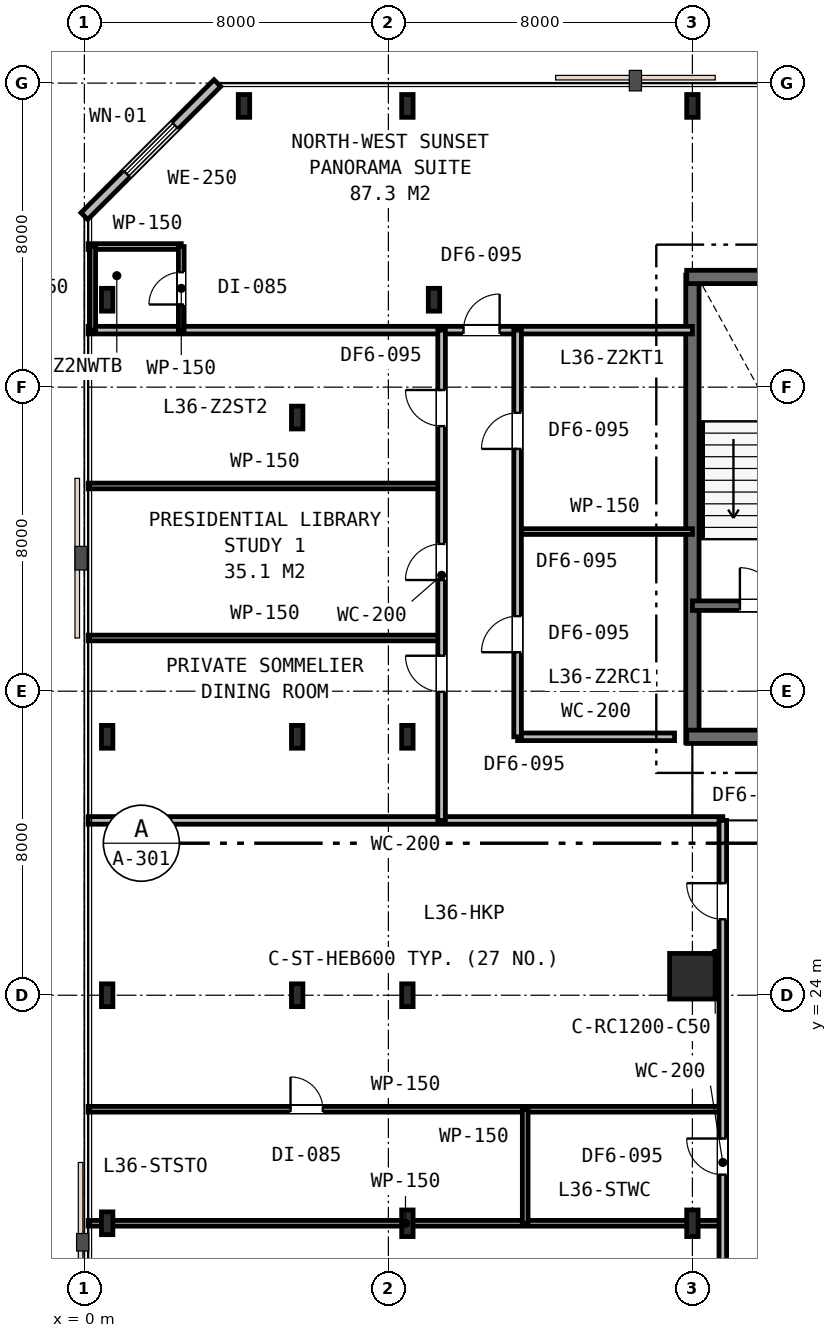
"""IFC4 building model, lengths in metres.
Left out: names, types, materials, properties, quantities, classifications, styles, units other than length and angle.
Written with IfcOpenShell. Run it as: python <this file> out.ifc"""

import sys

from ifc_helpers import new_model, si_unit, direction, frame, frame_2d, origin, origin_2d, place, context, subcontext, project, spatial, rectangle, i_section, extrude, element, fill, save


model = new_model("IFC4")
c1 = context("Model", 3, precision=1e-05, world=origin(), true_north=direction((0.0, 1.0)))
c2 = subcontext(c1, "Body", "Model", "MODEL_VIEW")
j1 = project(units=[si_unit("LENGTHUNIT", "METRE"), si_unit("PLANEANGLEUNIT", "RADIAN")], contexts=[c1])
p1 = place(None, origin())
s1 = spatial("IfcSite", under=j1, at=p1, CompositionType="ELEMENT")
p2 = place(p1, origin())
s2 = spatial("IfcBuilding", under=s1, at=p2, CompositionType="ELEMENT")
p3 = place(p2, frame((0.0, 0.0, 140.4)))
s3 = spatial("IfcBuildingStorey", under=s2, at=p3, CompositionType="ELEMENT", Elevation=140.4)
p4 = place(p3, frame((16.0, 30.65, 0.0), z_axis=(0.0, 0.0, 1.0), x_axis=(0.0, 1.0, 0.0)))
e1 = element("IfcWall", 1, at=p4, inside=s3, PredefinedType="SHEAR", context=c2, shape_type="SweptSolid", body=[
    extrude(rectangle(XDim=12.3, YDim=0.35, at=frame_2d((6.15, 0.0))), origin(), (0.0, 0.0, 1.0), 3.6),
])
p5 = place(p3, frame((15.85, 42.9, 0.0), z_axis=(0.0, 0.0, 1.0), x_axis=(1.0, 0.0, 0.0)))
e2 = element("IfcWall", 2, at=p5, inside=s3, PredefinedType="SHEAR", context=c2, shape_type="SweptSolid", body=[
    extrude(rectangle(XDim=24.3, YDim=0.35, at=frame_2d((12.15, 0.0))), origin(), (0.0, 0.0, 1.0), 3.6),
])
p6 = place(p3, frame((15.85, 30.8, 0.0), z_axis=(0.0, 0.0, 1.0), x_axis=(1.0, 0.0, 0.0)))
e3 = element("IfcWall", 3, at=p6, inside=s3, PredefinedType="SHEAR", context=c2, shape_type="SweptSolid", body=[
    extrude(rectangle(XDim=11.2, YDim=0.35, at=frame_2d((5.6, 0.0))), origin(), (0.0, 0.0, 1.0), 3.6),
])
p7 = place(p6, frame((2.45, 0.0, 0.0)))
e4 = element("IfcOpeningElement", 4, at=p7, cuts=e3, PredefinedType="OPENING", context=c2, shape_type="SweptSolid", body=[
    extrude(rectangle(XDim=1.1, YDim=2.15, at=frame_2d((0.55, 1.075))), frame((0.0, 0.185, 0.0), z_axis=(0.0, -1.0, 0.0), x_axis=(1.0, 0.0, 0.0)), (0.0, 0.0, 1.0), 0.37),
])
p8 = place(p3, frame((16.0, 34.25, 0.0), z_axis=(0.0, 0.0, 1.0), x_axis=(1.0, 0.0, 0.0)))
e5 = element("IfcWall", 5, at=p8, inside=s3, PredefinedType="SHEAR", context=c2, shape_type="SweptSolid", body=[
    extrude(rectangle(XDim=6.05, YDim=0.25, at=frame_2d((3.025, 0.0))), origin(), (0.0, 0.0, 1.0), 3.6),
])
p9 = place(p8, frame((1.25, 0.0, 0.0)))
e6 = element("IfcOpeningElement", 6, at=p9, cuts=e5, PredefinedType="OPENING", context=c2, shape_type="SweptSolid", body=[
    extrude(rectangle(XDim=1.0, YDim=2.15, at=frame_2d((0.5, 1.075))), frame((0.0, 0.135, 0.0), z_axis=(0.0, -1.0, 0.0), x_axis=(1.0, 0.0, 0.0)), (0.0, 0.0, 1.0), 0.27),
])
p10 = place(p8, frame((4.2, 0.0, 0.0)))
e7 = element("IfcOpeningElement", 7, at=p10, cuts=e5, PredefinedType="OPENING", context=c2, shape_type="SweptSolid", body=[
    extrude(rectangle(XDim=1.1, YDim=2.15, at=frame_2d((0.55, 1.075))), frame((0.0, 0.135, 0.0), z_axis=(0.0, -1.0, 0.0), x_axis=(1.0, 0.0, 0.0)), (0.0, 0.0, 1.0), 0.27),
])
p11 = place(p3, frame((8.5, 24.0, 0.0), z_axis=(0.0, 0.0, 1.0), x_axis=(1.0, 0.0, 0.0)))
e8 = element("IfcColumn", 8, at=p11, inside=s3, PredefinedType="COLUMN", context=c2, shape_type="SweptSolid", body=[
    extrude(i_section(OverallWidth=0.3, OverallDepth=0.6, WebThickness=0.015, FlangeThickness=0.03, FilletRadius=0.027, at=origin_2d()), origin(), (0.0, 0.0, 1.0), 3.6),
])
p12 = place(p3, frame((16.0, 24.5, 0.0), z_axis=(0.0, 0.0, 1.0), x_axis=(1.0, 0.0, 0.0)))
e9 = element("IfcColumn", 9, at=p12, inside=s3, PredefinedType="COLUMN", context=c2, shape_type="SweptSolid", body=[
    extrude(rectangle(XDim=1.2, YDim=1.2, at=origin_2d()), origin(), (0.0, 0.0, 1.0), 3.6),
])
for number, where, z_axis, x_axis in (
    (10, (5.6, 24.0, 0.0), (0.0, 0.0, 1.0), (1.0, 0.0, 0.0)),
    (11, (5.6, 30.8, 0.0), (0.0, 0.0, 1.0), (1.0, 0.0, 0.0)),
    (12, (5.6, 39.2, 0.0), (0.0, 0.0, 1.0), (1.0, 0.0, 0.0)),
    (13, (8.5, 30.8, 0.0), (0.0, 0.0, 1.0), (1.0, 0.0, 0.0)),
    (14, (9.2, 42.3, 0.0), (0.0, 0.0, 1.0), (1.0, 0.0, 0.0)),
    (15, (0.6, 24.0, 0.0), (0.0, 0.0, 1.0), (1.0, 0.0, 0.0)),
    (16, (0.6, 30.8, 0.0), (0.0, 0.0, 1.0), (1.0, 0.0, 0.0)),
    (17, (0.6, 42.3, 0.0), (0.0, 0.0, 1.0), (1.0, 0.0, 0.0)),
    (18, (4.2, 47.4, 0.0), (0.0, 0.0, 1.0), (1.0, 0.0, 0.0)),
    (19, (8.5, 47.4, 0.0), (0.0, 0.0, 1.0), (1.0, 0.0, 0.0)),
    (20, (16.0, 47.4, 0.0), (0.0, 0.0, 1.0), (1.0, 0.0, 0.0)),
    (21, (0.6, 18.0, 0.0), (0.0, 0.0, 1.0), (1.0, 0.0, 0.0)),
):
    element("IfcColumn", number, at=place(p3, frame(where, z_axis=z_axis, x_axis=x_axis)), inside=s3, PredefinedType="COLUMN", context=c2, shape_type="SweptSolid", body=[
        extrude(i_section(OverallWidth=0.3, OverallDepth=0.6, WebThickness=0.015, FlangeThickness=0.03, FilletRadius=0.027, at=origin_2d()), origin(), (0.0, 0.0, 1.0), 3.6),
    ])
for number, where, z_axis, x_axis in (
    (22, (8.5, 18.0, 0.0), (0.0, 0.0, 1.0), (1.0, 0.0, 0.0)),
    (23, (16.0, 18.0, 0.0), (0.0, 0.0, 1.0), (1.0, 0.0, 0.0)),
):
    element("IfcColumn", number, at=place(p3, frame(where, z_axis=z_axis, x_axis=x_axis)), inside=s3, PredefinedType="COLUMN", context=c2, shape_type="SweptSolid", body=[
        extrude(i_section(OverallWidth=0.3, OverallDepth=0.7, WebThickness=0.017, FlangeThickness=0.032, FilletRadius=0.027, at=origin_2d()), origin(), (0.0, 0.0, 1.0), 3.6),
    ])
p13 = place(p3, frame((3.5, 48.0, 0.0), z_axis=(0.0, 0.0, 1.0), x_axis=(-0.707106781187, -0.707106781187, 0.0)))
e24 = element("IfcWall", 24, at=p13, inside=s3, PredefinedType="STANDARD", context=c2, shape_type="SweptSolid", body=[
    extrude(rectangle(XDim=4.95, YDim=0.25, at=frame_2d((2.475, 0.0))), origin(), (0.0, 0.0, 1.0), 3.24),
])
p14 = place(p13, frame((1.575, 0.0, 0.75)))
e25 = element("IfcOpeningElement", 25, at=p14, cuts=e24, PredefinedType="OPENING", context=c2, shape_type="SweptSolid", body=[
    extrude(rectangle(XDim=1.8, YDim=1.85, at=frame_2d((0.9, 0.925))), frame((0.0, 0.135, 0.0), z_axis=(0.0, -1.0, 0.0), x_axis=(1.0, 0.0, 0.0)), (0.0, 0.0, 1.0), 0.27),
])
p15 = place(p3, frame((0.1, 28.6, 0.0), z_axis=(0.0, 0.0, 1.0), x_axis=(1.0, 0.0, 0.0)))
e26 = element("IfcWall", 26, at=p15, inside=s3, PredefinedType="PARTITIONING", context=c2, shape_type="SweptSolid", body=[
    extrude(rectangle(XDim=16.7, YDim=0.2, at=frame_2d((8.35, 0.0))), origin(), (0.0, 0.0, 1.0), 2.84),
])
p16 = place(p3, frame((11.4, 30.8, 0.0), z_axis=(0.0, 0.0, 1.0), x_axis=(1.0, 0.0, 0.0)))
e27 = element("IfcWall", 27, at=p16, inside=s3, PredefinedType="PARTITIONING", context=c2, shape_type="SweptSolid", body=[
    extrude(rectangle(XDim=4.13, YDim=0.2, at=frame_2d((2.065, 0.0))), origin(), (0.0, 0.0, 1.0), 2.84),
])
p17 = place(p3, frame((0.1, 18.0, 0.0), z_axis=(0.0, 0.0, 1.0), x_axis=(1.0, 0.0, 0.0)))
e28 = element("IfcWall", 28, at=p17, inside=s3, PredefinedType="PARTITIONING", context=c2, shape_type="SweptSolid", body=[
    extrude(rectangle(XDim=16.7, YDim=0.15, at=frame_2d((8.35, 0.0))), origin(), (0.0, 0.0, 1.0), 2.84),
])
p18 = place(p3, frame((0.1, 21.0, 0.0), z_axis=(0.0, 0.0, 1.0), x_axis=(1.0, 0.0, 0.0)))
e29 = element("IfcWall", 29, at=p18, inside=s3, PredefinedType="PARTITIONING", context=c2, shape_type="SweptSolid", body=[
    extrude(rectangle(XDim=16.7, YDim=0.15, at=frame_2d((8.35, 0.0))), origin(), (0.0, 0.0, 1.0), 2.84),
])
p19 = place(p18, frame((5.325, 0.0, 0.0)))
e30 = element("IfcOpeningElement", 30, at=p19, cuts=e29, PredefinedType="OPENING", context=c2, shape_type="SweptSolid", body=[
    extrude(rectangle(XDim=0.85, YDim=2.15, at=frame_2d((0.425, 1.075))), frame((0.0, 0.085, 0.0), z_axis=(0.0, -1.0, 0.0), x_axis=(1.0, 0.0, 0.0)), (0.0, 0.0, 1.0), 0.17),
])
p20 = place(p3, frame((11.6, 18.0, 0.0), z_axis=(0.0, 0.0, 1.0), x_axis=(0.0, 1.0, 0.0)))
e31 = element("IfcWall", 31, at=p20, inside=s3, PredefinedType="PARTITIONING", context=c2, shape_type="SweptSolid", body=[
    extrude(rectangle(XDim=3.0, YDim=0.15, at=frame_2d((1.5, 0.0))), origin(), (0.0, 0.0, 1.0), 2.84),
])
p21 = place(p3, frame((16.8, 10.6, 0.0), z_axis=(0.0, 0.0, 1.0), x_axis=(0.0, 1.0, 0.0)))
e32 = element("IfcWall", 32, at=p21, inside=s3, PredefinedType="PARTITIONING", context=c2, shape_type="SweptSolid", body=[
    extrude(rectangle(XDim=18.0, YDim=0.2, at=frame_2d((9.0, 0.0))), origin(), (0.0, 0.0, 1.0), 2.84),
])
p22 = place(p21, frame((8.679, 0.0, 0.0)))
e33 = element("IfcOpeningElement", 33, at=p22, cuts=e32, PredefinedType="OPENING", context=c2, shape_type="SweptSolid", body=[
    extrude(rectangle(XDim=0.95, YDim=2.15, at=frame_2d((0.475, 1.075))), frame((0.0, 0.11, 0.0), z_axis=(0.0, -1.0, 0.0), x_axis=(1.0, 0.0, 0.0)), (0.0, 0.0, 1.0), 0.22),
])
p23 = place(p21, frame((15.399, 0.0, 0.0)))
e34 = element("IfcOpeningElement", 34, at=p23, cuts=e32, PredefinedType="OPENING", context=c2, shape_type="SweptSolid", body=[
    extrude(rectangle(XDim=0.95, YDim=2.15, at=frame_2d((0.475, 1.075))), frame((0.0, 0.11, 0.0), z_axis=(0.0, -1.0, 0.0), x_axis=(1.0, 0.0, 0.0)), (0.0, 0.0, 1.0), 0.22),
])
p24 = place(p21, frame((4.273, 0.0, 0.0)))
e35 = element("IfcOpeningElement", 35, at=p24, cuts=e32, PredefinedType="OPENING", context=c2, shape_type="SweptSolid", body=[
    extrude(rectangle(XDim=0.95, YDim=2.15, at=frame_2d((0.475, 1.075))), frame((0.0, 0.11, 0.0), z_axis=(0.0, -1.0, 0.0), x_axis=(1.0, 0.0, 0.0)), (0.0, 0.0, 1.0), 0.22),
])
p25 = place(p3, frame((0.1, 41.5, 0.0), z_axis=(0.0, 0.0, 1.0), x_axis=(1.0, 0.0, 0.0)))
e36 = element("IfcWall", 36, at=p25, inside=s3, PredefinedType="PARTITIONING", context=c2, shape_type="SweptSolid", body=[
    extrude(rectangle(XDim=15.9, YDim=0.2, at=frame_2d((7.95, 0.0))), origin(), (0.0, 0.0, 1.0), 2.84),
])
p26 = place(p25, frame((9.877, 0.0, 0.0)))
e37 = element("IfcOpeningElement", 37, at=p26, cuts=e36, PredefinedType="OPENING", context=c2, shape_type="SweptSolid", body=[
    extrude(rectangle(XDim=0.95, YDim=2.15, at=frame_2d((0.475, 1.075))), frame((0.0, 0.11, 0.0), z_axis=(0.0, -1.0, 0.0), x_axis=(1.0, 0.0, 0.0)), (0.0, 0.0, 1.0), 0.22),
])
p27 = place(p3, frame((0.1, 43.7, 0.0), z_axis=(0.0, 0.0, 1.0), x_axis=(1.0, 0.0, 0.0)))
e38 = element("IfcWall", 38, at=p27, inside=s3, PredefinedType="PARTITIONING", context=c2, shape_type="SweptSolid", body=[
    extrude(rectangle(XDim=2.45, YDim=0.15, at=frame_2d((1.225, 0.0))), origin(), (0.0, 0.0, 1.0), 3.24),
])
p28 = place(p3, frame((2.55, 41.5, 0.0), z_axis=(0.0, 0.0, 1.0), x_axis=(0.0, 1.0, 0.0)))
e39 = element("IfcWall", 39, at=p28, inside=s3, PredefinedType="PARTITIONING", context=c2, shape_type="SweptSolid", body=[
    extrude(rectangle(XDim=2.2, YDim=0.15, at=frame_2d((1.1, 0.0))), origin(), (0.0, 0.0, 1.0), 2.84),
])
p29 = place(p28, frame((0.675, 0.0, 0.0)))
e40 = element("IfcOpeningElement", 40, at=p29, cuts=e39, PredefinedType="OPENING", context=c2, shape_type="SweptSolid", body=[
    extrude(rectangle(XDim=0.85, YDim=2.15, at=frame_2d((0.425, 1.075))), frame((0.0, 0.085, 0.0), z_axis=(0.0, -1.0, 0.0), x_axis=(1.0, 0.0, 0.0)), (0.0, 0.0, 1.0), 0.17),
])
p30 = place(p3, frame((0.22, 41.5, 0.0), z_axis=(0.0, 0.0, 1.0), x_axis=(0.0, 1.0, 0.0)))
e41 = element("IfcWall", 41, at=p30, inside=s3, PredefinedType="PARTITIONING", context=c2, shape_type="SweptSolid", body=[
    extrude(rectangle(XDim=2.2, YDim=0.15, at=frame_2d((1.1, 0.0))), origin(), (0.0, 0.0, 1.0), 2.84),
])
for number, where, z_axis, x_axis in (
    (42, (0.1, 33.4, 0.0), (0.0, 0.0, 1.0), (1.0, 0.0, 0.0)),
    (43, (0.1, 37.4, 0.0), (0.0, 0.0, 1.0), (1.0, 0.0, 0.0)),
):
    element("IfcWall", number, at=place(p3, frame(where, z_axis=z_axis, x_axis=x_axis)), inside=s3, PredefinedType="PARTITIONING", context=c2, shape_type="SweptSolid", body=[
        extrude(rectangle(XDim=9.3, YDim=0.15, at=frame_2d((4.65, 0.0))), origin(), (0.0, 0.0, 1.0), 2.84),
    ])
p31 = place(p3, frame((11.4, 36.2, 0.0), z_axis=(0.0, 0.0, 1.0), x_axis=(1.0, 0.0, 0.0)))
e44 = element("IfcWall", 44, at=p31, inside=s3, PredefinedType="PARTITIONING", context=c2, shape_type="SweptSolid", body=[
    extrude(rectangle(XDim=4.6, YDim=0.15, at=frame_2d((2.3, 0.0))), origin(), (0.0, 0.0, 1.0), 3.24),
])
p32 = place(p3, frame((9.4, 28.6, 0.0), z_axis=(0.0, 0.0, 1.0), x_axis=(0.0, 1.0, 0.0)))
e45 = element("IfcWall", 45, at=p32, inside=s3, PredefinedType="PARTITIONING", context=c2, shape_type="SweptSolid", body=[
    extrude(rectangle(XDim=12.9, YDim=0.2, at=frame_2d((6.45, 0.0))), origin(), (0.0, 0.0, 1.0), 2.84),
])
p33 = place(p32, frame((3.383, 0.0, 0.0)))
e46 = element("IfcOpeningElement", 46, at=p33, cuts=e45, PredefinedType="OPENING", context=c2, shape_type="SweptSolid", body=[
    extrude(rectangle(XDim=0.95, YDim=2.15, at=frame_2d((0.475, 1.075))), frame((0.0, 0.11, 0.0), z_axis=(0.0, -1.0, 0.0), x_axis=(1.0, 0.0, 0.0)), (0.0, 0.0, 1.0), 0.22),
])
p34 = place(p32, frame((6.325, 0.0, 0.0)))
e47 = element("IfcOpeningElement", 47, at=p34, cuts=e45, PredefinedType="OPENING", context=c2, shape_type="SweptSolid", body=[
    extrude(rectangle(XDim=0.95, YDim=2.15, at=frame_2d((0.475, 1.075))), frame((0.0, 0.11, 0.0), z_axis=(0.0, -1.0, 0.0), x_axis=(1.0, 0.0, 0.0)), (0.0, 0.0, 1.0), 0.22),
])
p35 = place(p32, frame((10.375, 0.0, 0.0)))
e48 = element("IfcOpeningElement", 48, at=p35, cuts=e45, PredefinedType="OPENING", context=c2, shape_type="SweptSolid", body=[
    extrude(rectangle(XDim=0.95, YDim=2.15, at=frame_2d((0.475, 1.075))), frame((0.0, 0.11, 0.0), z_axis=(0.0, -1.0, 0.0), x_axis=(1.0, 0.0, 0.0)), (0.0, 0.0, 1.0), 0.22),
])
p36 = place(p3, frame((11.4, 30.8, 0.0), z_axis=(0.0, 0.0, 1.0), x_axis=(0.0, 1.0, 0.0)))
e49 = element("IfcWall", 49, at=p36, inside=s3, PredefinedType="PARTITIONING", context=c2, shape_type="SweptSolid", body=[
    extrude(rectangle(XDim=10.7, YDim=0.2, at=frame_2d((5.35, 0.0))), origin(), (0.0, 0.0, 1.0), 2.84),
])
p37 = place(p36, frame((2.225, 0.0, 0.0)))
e50 = element("IfcOpeningElement", 50, at=p37, cuts=e49, PredefinedType="OPENING", context=c2, shape_type="SweptSolid", body=[
    extrude(rectangle(XDim=0.95, YDim=2.15, at=frame_2d((0.475, 1.075))), frame((0.0, 0.11, 0.0), z_axis=(0.0, -1.0, 0.0), x_axis=(1.0, 0.0, 0.0)), (0.0, 0.0, 1.0), 0.22),
])
p38 = place(p36, frame((7.575, 0.0, 0.0)))
e51 = element("IfcOpeningElement", 51, at=p38, cuts=e49, PredefinedType="OPENING", context=c2, shape_type="SweptSolid", body=[
    extrude(rectangle(XDim=0.95, YDim=2.15, at=frame_2d((0.475, 1.075))), frame((0.0, 0.11, 0.0), z_axis=(0.0, -1.0, 0.0), x_axis=(1.0, 0.0, 0.0)), (0.0, 0.0, 1.0), 0.22),
])
p39 = place(p14, origin())
e52 = element("IfcWindow", 52, at=p39, inside=s3, PartitioningType="SINGLE_PANEL", PredefinedType="WINDOW", context=c2, shape_type="SweptSolid", body=[
    extrude(rectangle(XDim=1.8, YDim=1.85, at=frame_2d((0.9, 0.925))), frame((0.0, 0.03, 0.0), z_axis=(0.0, -1.0, 0.0), x_axis=(1.0, 0.0, 0.0)), (0.0, 0.0, 1.0), 0.06),
])
fill(e25, e52)
p40 = place(p9, origin())
e53 = element("IfcDoor", 53, at=p40, inside=s3, OperationType="SINGLE_SWING_LEFT", PredefinedType="DOOR", context=c2, shape_type="SweptSolid", body=[
    extrude(rectangle(XDim=1.0, YDim=2.15, at=frame_2d((0.5, 1.075))), frame((0.0, 0.025, 0.0), z_axis=(0.0, -1.0, 0.0), x_axis=(1.0, 0.0, 0.0)), (0.0, 0.0, 1.0), 0.05),
])
fill(e6, e53)
p41 = place(p22, origin())
e54 = element("IfcDoor", 54, at=p41, inside=s3, OperationType="SINGLE_SWING_RIGHT", PredefinedType="DOOR", context=c2, shape_type="SweptSolid", body=[
    extrude(rectangle(XDim=0.95, YDim=2.15, at=frame_2d((0.475, 1.075))), frame((0.0, 0.025, 0.0), z_axis=(0.0, -1.0, 0.0), x_axis=(1.0, 0.0, 0.0)), (0.0, 0.0, 1.0), 0.05),
])
fill(e33, e54)
p42 = place(p19, origin())
e55 = element("IfcDoor", 55, at=p42, inside=s3, OperationType="SINGLE_SWING_LEFT", PredefinedType="DOOR", context=c2, shape_type="SweptSolid", body=[
    extrude(rectangle(XDim=0.85, YDim=2.15, at=frame_2d((0.425, 1.075))), frame((0.0, 0.025, 0.0), z_axis=(0.0, -1.0, 0.0), x_axis=(1.0, 0.0, 0.0)), (0.0, 0.0, 1.0), 0.05),
])
fill(e30, e55)
p43 = place(p23, origin())
e56 = element("IfcDoor", 56, at=p43, inside=s3, OperationType="SINGLE_SWING_RIGHT", PredefinedType="DOOR", context=c2, shape_type="SweptSolid", body=[
    extrude(rectangle(XDim=0.95, YDim=2.15, at=frame_2d((0.475, 1.075))), frame((0.0, 0.025, 0.0), z_axis=(0.0, -1.0, 0.0), x_axis=(1.0, 0.0, 0.0)), (0.0, 0.0, 1.0), 0.05),
])
fill(e34, e56)
p44 = place(p26, origin())
e57 = element("IfcDoor", 57, at=p44, inside=s3, OperationType="SINGLE_SWING_RIGHT", PredefinedType="DOOR", context=c2, shape_type="SweptSolid", body=[
    extrude(rectangle(XDim=0.95, YDim=2.15, at=frame_2d((0.475, 1.075))), frame((0.0, 0.025, 0.0), z_axis=(0.0, -1.0, 0.0), x_axis=(1.0, 0.0, 0.0)), (0.0, 0.0, 1.0), 0.05),
])
fill(e37, e57)
p45 = place(p29, origin())
e58 = element("IfcDoor", 58, at=p45, inside=s3, OperationType="SINGLE_SWING_LEFT", PredefinedType="DOOR", context=c2, shape_type="SweptSolid", body=[
    extrude(rectangle(XDim=0.85, YDim=2.15, at=frame_2d((0.425, 1.075))), frame((0.0, 0.025, 0.0), z_axis=(0.0, -1.0, 0.0), x_axis=(1.0, 0.0, 0.0)), (0.0, 0.0, 1.0), 0.05),
])
fill(e40, e58)
p46 = place(p33, origin())
e59 = element("IfcDoor", 59, at=p46, inside=s3, OperationType="SINGLE_SWING_RIGHT", PredefinedType="DOOR", context=c2, shape_type="SweptSolid", body=[
    extrude(rectangle(XDim=0.95, YDim=2.15, at=frame_2d((0.475, 1.075))), frame((0.0, 0.025, 0.0), z_axis=(0.0, -1.0, 0.0), x_axis=(1.0, 0.0, 0.0)), (0.0, 0.0, 1.0), 0.05),
])
fill(e46, e59)
p47 = place(p34, origin())
e60 = element("IfcDoor", 60, at=p47, inside=s3, OperationType="SINGLE_SWING_LEFT", PredefinedType="DOOR", context=c2, shape_type="SweptSolid", body=[
    extrude(rectangle(XDim=0.95, YDim=2.15, at=frame_2d((0.475, 1.075))), frame((0.0, 0.025, 0.0), z_axis=(0.0, -1.0, 0.0), x_axis=(1.0, 0.0, 0.0)), (0.0, 0.0, 1.0), 0.05),
])
fill(e47, e60)
p48 = place(p35, origin())
e61 = element("IfcDoor", 61, at=p48, inside=s3, OperationType="SINGLE_SWING_RIGHT", PredefinedType="DOOR", context=c2, shape_type="SweptSolid", body=[
    extrude(rectangle(XDim=0.95, YDim=2.15, at=frame_2d((0.475, 1.075))), frame((0.0, 0.025, 0.0), z_axis=(0.0, -1.0, 0.0), x_axis=(1.0, 0.0, 0.0)), (0.0, 0.0, 1.0), 0.05),
])
fill(e48, e61)
p49 = place(p37, origin())
e62 = element("IfcDoor", 62, at=p49, inside=s3, OperationType="SINGLE_SWING_LEFT", PredefinedType="DOOR", context=c2, shape_type="SweptSolid", body=[
    extrude(rectangle(XDim=0.95, YDim=2.15, at=frame_2d((0.475, 1.075))), frame((0.0, 0.025, 0.0), z_axis=(0.0, -1.0, 0.0), x_axis=(1.0, 0.0, 0.0)), (0.0, 0.0, 1.0), 0.05),
])
fill(e50, e62)
p50 = place(p38, origin())
e63 = element("IfcDoor", 63, at=p50, inside=s3, OperationType="SINGLE_SWING_LEFT", PredefinedType="DOOR", context=c2, shape_type="SweptSolid", body=[
    extrude(rectangle(XDim=0.95, YDim=2.15, at=frame_2d((0.475, 1.075))), frame((0.0, 0.025, 0.0), z_axis=(0.0, -1.0, 0.0), x_axis=(1.0, 0.0, 0.0)), (0.0, 0.0, 1.0), 0.05),
])
fill(e51, e63)
save(model, sys.argv[1])
